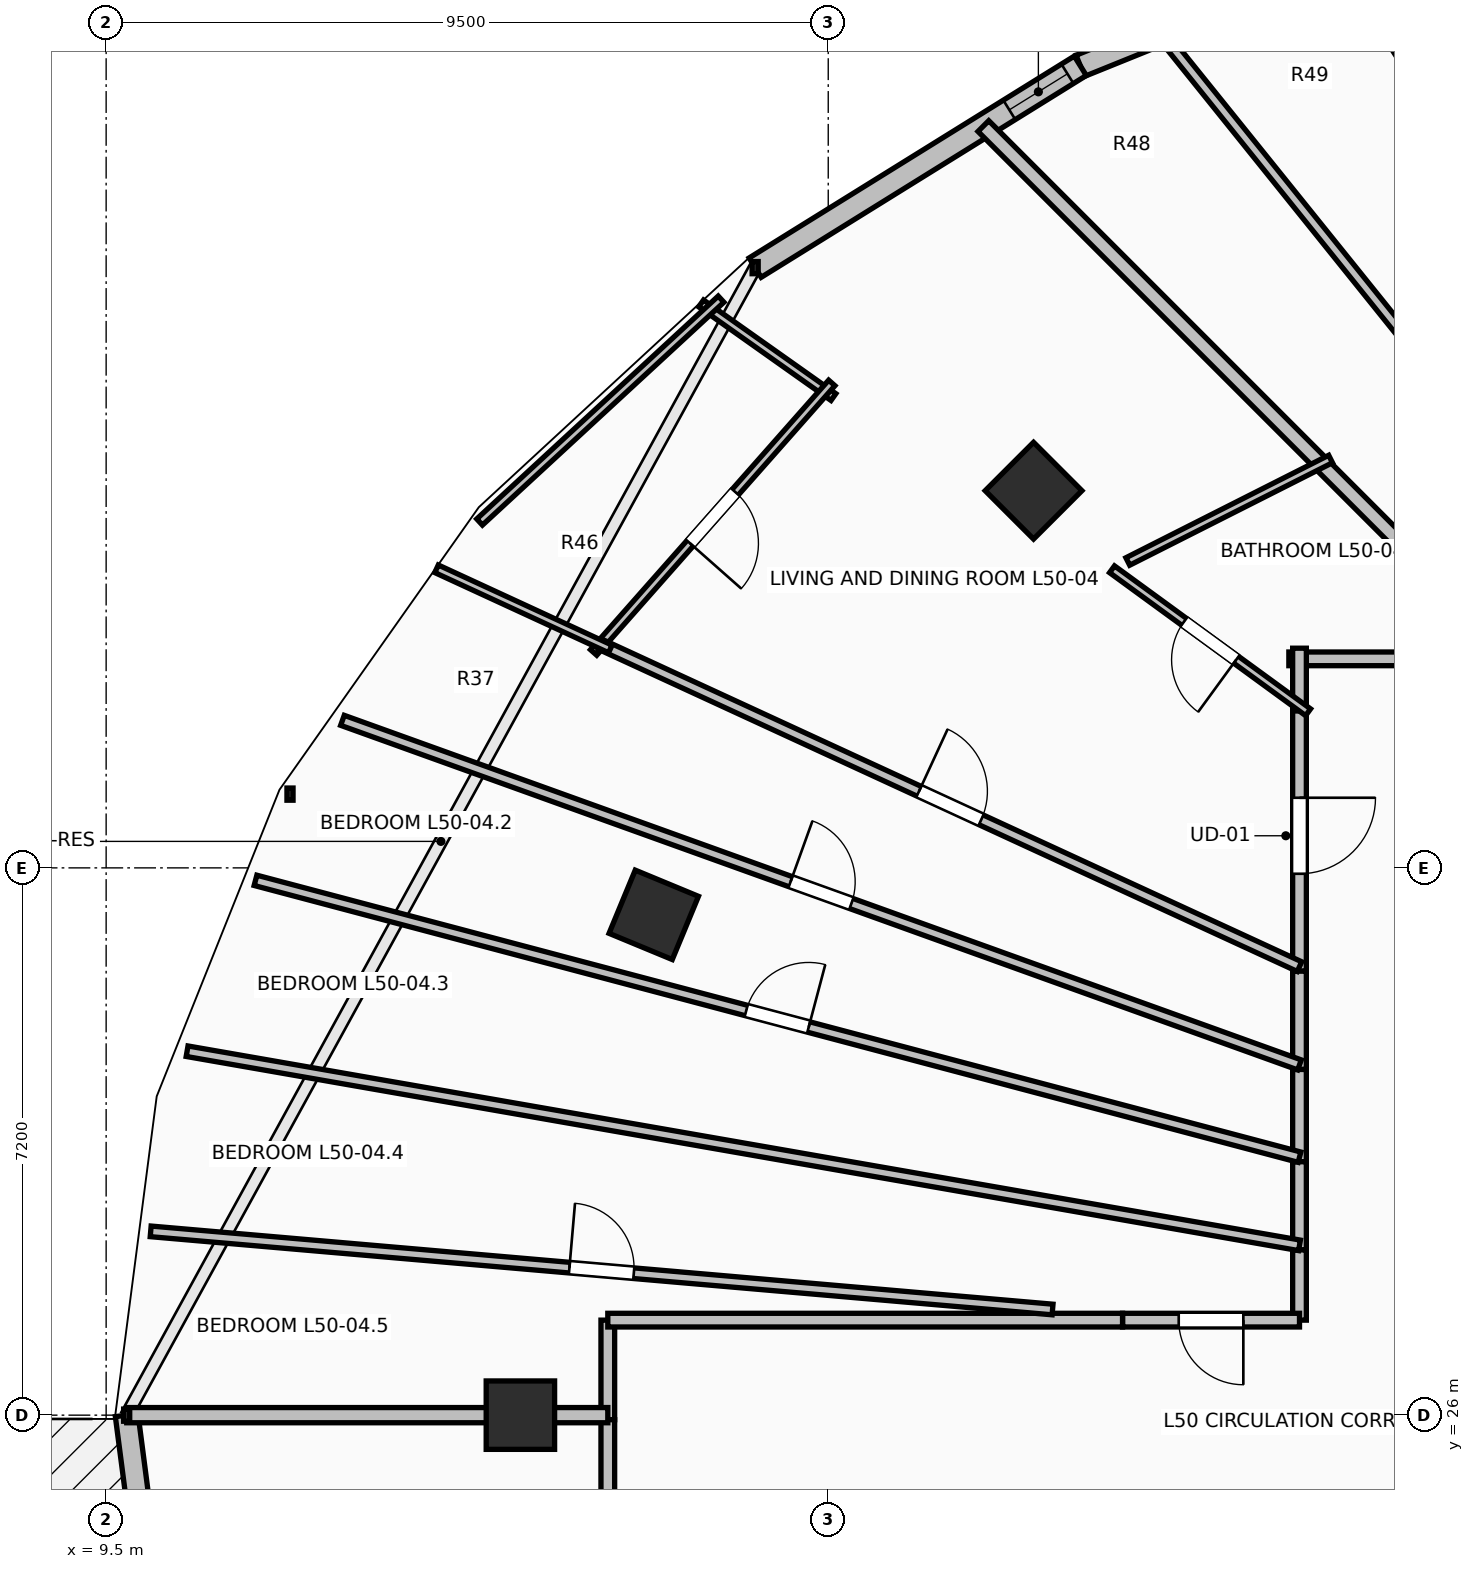
"""IFC4 building model, lengths in metres.
Left out: names, types, materials, properties, quantities, classifications, styles, units other than length and angle.
Written with IfcOpenShell. Run it as: python <this file> out.ifc"""

import sys

from ifc_helpers import new_model, si_unit, direction, frame, frame_2d, origin, origin_2d, place, context, subcontext, project, spatial, rectangle, extrude, element, fill, save


model = new_model("IFC4")
c1 = context("Model", 3, precision=1e-05, world=origin(), true_north=direction((0.0, 1.0)))
c2 = subcontext(c1, "Body", "Model", "MODEL_VIEW")
j1 = project(units=[si_unit("LENGTHUNIT", "METRE"), si_unit("PLANEANGLEUNIT", "RADIAN")], contexts=[c1])
p1 = place(None, origin())
s1 = spatial("IfcSite", under=j1, at=p1, CompositionType="ELEMENT")
p2 = place(p1, origin())
s2 = spatial("IfcBuilding", under=s1, at=p2, CompositionType="ELEMENT")
p3 = place(p2, frame((0.0, 0.0, 186.1)))
s3 = spatial("IfcBuildingStorey", under=s2, at=p3, CompositionType="ELEMENT", Elevation=186.1)
for number, where, z_axis, x_axis in (
    (1, (21.701, 38.162, 0.0), (0.0, 0.0, 1.0), (-0.707, 0.707, 0.0)),
    (2, (16.705, 32.582, 0.0), (0.0, 0.0, 1.0), (-0.924, 0.383, 0.0)),
    (3, (14.95, 26.0, 0.0), (0.0, 0.0, 1.0), (-1.0, 0.0, 0.0)),
):
    element("IfcColumn", number, at=place(p3, frame(where, z_axis=z_axis, x_axis=x_axis)), inside=s3, PredefinedType="COLUMN", context=c2, shape_type="SweptSolid", body=[
        extrude(rectangle(XDim=0.9, YDim=0.9, at=origin_2d()), origin(), (0.0, 0.0, 1.0), 3.5),
    ])
p4 = place(p3, frame((27.197, 45.725, 0.0), z_axis=(0.0, 0.0, 1.0), x_axis=(-0.927111094334, -0.374786630981, 0.0)))
e4 = element("IfcWall", 4, at=p4, inside=s3, PredefinedType="STANDARD", context=c2, shape_type="SweptSolid", body=[
    extrude(rectangle(XDim=5.264, YDim=0.3, at=frame_2d((2.632, 0.0))), origin(), (0.0, 0.0, 1.0), 3.24),
])
p5 = place(p4, frame((0.258, 0.0, 0.85)))
e5 = element("IfcOpeningElement", 5, at=p5, cuts=e4, PredefinedType="OPENING", context=c2, shape_type="SweptSolid", body=[
    extrude(rectangle(XDim=0.9, YDim=1.8, at=frame_2d((0.45, 0.9))), frame((0.0, 0.165, 0.0), z_axis=(0.0, -1.0, 0.0), x_axis=(1.0, 0.0, 0.0)), (0.0, 0.0, 1.0), 0.33),
])
p6 = place(p4, frame((2.032, 0.0, 0.85)))
e6 = element("IfcOpeningElement", 6, at=p6, cuts=e4, PredefinedType="OPENING", context=c2, shape_type="SweptSolid", body=[
    extrude(rectangle(XDim=1.2, YDim=1.95, at=frame_2d((0.6, 0.975))), frame((0.0, 0.165, 0.0), z_axis=(0.0, -1.0, 0.0), x_axis=(1.0, 0.0, 0.0)), (0.0, 0.0, 1.0), 0.33),
])
p7 = place(p3, frame((22.316, 43.752, 0.0), z_axis=(0.0, 0.0, 1.0), x_axis=(-0.849647657754, -0.527350791858, 0.0)))
e7 = element("IfcWall", 7, at=p7, inside=s3, PredefinedType="STANDARD", context=c2, shape_type="SweptSolid", body=[
    extrude(rectangle(XDim=5.035, YDim=0.3, at=frame_2d((2.518, 0.0))), origin(), (0.0, 0.0, 1.0), 3.24),
])
p8 = place(p7, frame((0.199, 0.0, 0.85)))
e8 = element("IfcOpeningElement", 8, at=p8, cuts=e7, PredefinedType="OPENING", context=c2, shape_type="SweptSolid", body=[
    extrude(rectangle(XDim=0.9, YDim=1.8, at=frame_2d((0.45, 0.9))), frame((0.0, 0.165, 0.0), z_axis=(0.0, -1.0, 0.0), x_axis=(1.0, 0.0, 0.0)), (0.0, 0.0, 1.0), 0.33),
])
p9 = place(p3, frame((9.77, 26.0, 0.0), z_axis=(0.0, 0.0, 1.0), x_axis=(0.129147853268, -0.991625348605, 0.0)))
e9 = element("IfcWall", 9, at=p9, inside=s3, PredefinedType="STANDARD", context=c2, shape_type="SweptSolid", body=[
    extrude(rectangle(XDim=4.2, YDim=0.3, at=frame_2d((2.1, 0.0))), origin(), (0.0, 0.0, 1.0), 3.24),
])
p10 = place(p9, frame((1.3, 0.0, 0.0)))
e10 = element("IfcOpeningElement", 10, at=p10, cuts=e9, PredefinedType="OPENING", context=c2, shape_type="SweptSolid", body=[
    extrude(rectangle(XDim=1.6, YDim=2.3, at=frame_2d((0.8, 1.15))), frame((0.0, 0.165, 0.0), z_axis=(0.0, -1.0, 0.0), x_axis=(1.0, 0.0, 0.0)), (0.0, 0.0, 1.0), 0.33),
])
p11 = place(p3, frame((25.2, 35.404, 0.0), z_axis=(0.0, 0.0, 1.0), x_axis=(0.0, -1.0, 0.0)))
e11 = element("IfcWall", 11, at=p11, inside=s3, PredefinedType="PARTITIONING", context=c2, shape_type="SweptSolid", body=[
    extrude(rectangle(XDim=3.563, YDim=0.18, at=frame_2d((1.781, 0.0))), origin(), (0.0, 0.0, 1.0), 2.432),
])
p12 = place(p11, frame((1.281, 0.0, 0.0)))
e12 = element("IfcOpeningElement", 12, at=p12, cuts=e11, PredefinedType="OPENING", context=c2, shape_type="SweptSolid", body=[
    extrude(rectangle(XDim=1.0, YDim=2.15, at=frame_2d((0.5, 1.075))), frame((0.0, 0.105, 0.0), z_axis=(0.0, -1.0, 0.0), x_axis=(1.0, 0.0, 0.0)), (0.0, 0.0, 1.0), 0.21),
])
p13 = place(p3, frame((28.105, 35.95, 0.0), z_axis=(0.0, 0.0, 1.0), x_axis=(-1.0, 0.0, 0.0)))
e13 = element("IfcWall", 13, at=p13, inside=s3, PredefinedType="PARTITIONING", context=c2, shape_type="SweptSolid", body=[
    extrude(rectangle(XDim=3.045, YDim=0.18, at=frame_2d((1.522, 0.0))), origin(), (0.0, 0.0, 1.0), 2.432),
])
p14 = place(p3, frame((25.2, 36.09, 0.0), z_axis=(0.0, 0.0, 1.0), x_axis=(0.0, -1.0, 0.0)))
e14 = element("IfcWall", 14, at=p14, inside=s3, PredefinedType="PARTITIONING", context=c2, shape_type="SweptSolid", body=[
    extrude(rectangle(XDim=0.826, YDim=0.18, at=frame_2d((0.413, 0.0))), origin(), (0.0, 0.0, 1.0), 2.432),
])
p15 = place(p3, frame((25.2, 31.841, 0.0), z_axis=(0.0, 0.0, 1.0), x_axis=(0.0, -1.0, 0.0)))
e15 = element("IfcWall", 15, at=p15, inside=s3, PredefinedType="PARTITIONING", context=c2, shape_type="SweptSolid", body=[
    extrude(rectangle(XDim=1.293, YDim=0.18, at=frame_2d((0.646, 0.0))), origin(), (0.0, 0.0, 1.0), 3.24),
])
p16 = place(p3, frame((25.2, 30.548, 0.0), z_axis=(0.0, 0.0, 1.0), x_axis=(0.0, -1.0, 0.0)))
e16 = element("IfcWall", 16, at=p16, inside=s3, PredefinedType="PARTITIONING", context=c2, shape_type="SweptSolid", body=[
    extrude(rectangle(XDim=1.214, YDim=0.18, at=frame_2d((0.607, 0.0))), origin(), (0.0, 0.0, 1.0), 2.432),
])
p17 = place(p3, frame((25.2, 29.334, 0.0), z_axis=(0.0, 0.0, 1.0), x_axis=(0.0, -1.0, 0.0)))
e17 = element("IfcWall", 17, at=p17, inside=s3, PredefinedType="PARTITIONING", context=c2, shape_type="SweptSolid", body=[
    extrude(rectangle(XDim=1.16, YDim=0.18, at=frame_2d((0.58, 0.0))), origin(), (0.0, 0.0, 1.0), 2.432),
])
p18 = place(p3, frame((25.2, 28.174, 0.0), z_axis=(0.0, 0.0, 1.0), x_axis=(0.0, -1.0, 0.0)))
e18 = element("IfcWall", 18, at=p18, inside=s3, PredefinedType="PARTITIONING", context=c2, shape_type="SweptSolid", body=[
    extrude(rectangle(XDim=0.924, YDim=0.18, at=frame_2d((0.462, 0.0))), origin(), (0.0, 0.0, 1.0), 2.432),
])
p19 = place(p3, frame((25.2, 27.25, 0.0), z_axis=(0.0, 0.0, 1.0), x_axis=(-1.0, 0.0, 0.0)))
e19 = element("IfcWall", 19, at=p19, inside=s3, PredefinedType="PARTITIONING", context=c2, shape_type="SweptSolid", body=[
    extrude(rectangle(XDim=2.328, YDim=0.18, at=frame_2d((1.164, 0.0))), origin(), (0.0, 0.0, 1.0), 2.432),
])
p20 = place(p19, frame((0.739, 0.0, 0.0)))
e20 = element("IfcOpeningElement", 20, at=p20, cuts=e19, PredefinedType="OPENING", context=c2, shape_type="SweptSolid", body=[
    extrude(rectangle(XDim=0.85, YDim=2.1, at=frame_2d((0.425, 1.05))), frame((0.0, 0.105, 0.0), z_axis=(0.0, -1.0, 0.0), x_axis=(1.0, 0.0, 0.0)), (0.0, 0.0, 1.0), 0.21),
])
p21 = place(p3, frame((16.1, 27.25, 0.0), z_axis=(0.0, 0.0, 1.0), x_axis=(0.0, -1.0, 0.0)))
e21 = element("IfcWall", 21, at=p21, inside=s3, PredefinedType="PARTITIONING", context=c2, shape_type="SweptSolid", body=[
    extrude(rectangle(XDim=1.31, YDim=0.18, at=frame_2d((0.655, 0.0))), origin(), (0.0, 0.0, 1.0), 2.432),
])
p22 = place(p3, frame((22.872, 27.25, 0.0), z_axis=(0.0, 0.0, 1.0), x_axis=(-1.0, 0.0, 0.0)))
e22 = element("IfcWall", 22, at=p22, inside=s3, PredefinedType="PARTITIONING", context=c2, shape_type="SweptSolid", body=[
    extrude(rectangle(XDim=6.772, YDim=0.18, at=frame_2d((3.386, 0.0))), origin(), (0.0, 0.0, 1.0), 2.432),
])
p23 = place(p3, frame((16.1, 25.94, 0.0), z_axis=(0.0, 0.0, 1.0), x_axis=(0.0, -1.0, 0.0)))
e23 = element("IfcWall", 23, at=p23, inside=s3, PredefinedType="PARTITIONING", context=c2, shape_type="SweptSolid", body=[
    extrude(rectangle(XDim=1.39, YDim=0.18, at=frame_2d((0.695, 0.0))), origin(), (0.0, 0.0, 1.0), 2.432),
])
p24 = place(p3, frame((25.749, 45.138, 0.0), z_axis=(0.0, 0.0, 1.0), x_axis=(0.539168632786, -0.842197830335, 0.0)))
e24 = element("IfcWall", 24, at=p24, inside=s3, PredefinedType="PARTITIONING", context=c2, shape_type="SweptSolid", body=[
    extrude(rectangle(XDim=10.909, YDim=0.14, at=frame_2d((5.455, 0.0))), origin(), (0.0, 0.0, 1.0), 2.432),
])
p25 = place(p3, frame((23.378, 44.178, 0.0), z_axis=(0.0, 0.0, 1.0), x_axis=(0.626756813732, -0.779214923137, 0.0)))
e25 = element("IfcWall", 25, at=p25, inside=s3, PredefinedType="PARTITIONING", context=c2, shape_type="SweptSolid", body=[
    extrude(rectangle(XDim=10.559, YDim=0.14, at=frame_2d((5.28, 0.0))), origin(), (0.0, 0.0, 1.0), 2.432),
])
p26 = place(p3, frame((21.041, 42.959, 0.0), z_axis=(0.0, 0.0, 1.0), x_axis=(0.707106781187, -0.707106781187, 0.0)))
e26 = element("IfcWall", 26, at=p26, inside=s3, PredefinedType="PARTITIONING", context=c2, shape_type="SweptSolid", body=[
    extrude(rectangle(XDim=9.912, YDim=0.2, at=frame_2d((4.956, 0.0))), origin(), (0.0, 0.0, 1.0), 2.432),
])
p27 = place(p3, frame((25.313, 35.248, 0.0), z_axis=(0.0, 0.0, 1.0), x_axis=(-0.807968083988, 0.58922625133, 0.0)))
e27 = element("IfcWall", 27, at=p27, inside=s3, PredefinedType="PARTITIONING", context=c2, shape_type="SweptSolid", body=[
    extrude(rectangle(XDim=3.192, YDim=0.11, at=frame_2d((1.596, 0.0))), origin(), (0.0, 0.0, 1.0), 2.432),
])
p28 = place(p27, frame((1.171, 0.0, 0.0)))
e28 = element("IfcOpeningElement", 28, at=p28, cuts=e27, PredefinedType="OPENING", context=c2, shape_type="SweptSolid", body=[
    extrude(rectangle(XDim=0.85, YDim=2.1, at=frame_2d((0.425, 1.05))), frame((0.0, 0.07, 0.0), z_axis=(0.0, -1.0, 0.0), x_axis=(1.0, 0.0, 0.0)), (0.0, 0.0, 1.0), 0.14),
])
p29 = place(p3, frame((22.941, 37.231, 0.0), z_axis=(0.0, 0.0, 1.0), x_axis=(0.892507731149, 0.451032094024, 0.0)))
e29 = element("IfcWall", 29, at=p29, inside=s3, PredefinedType="PARTITIONING", context=c2, shape_type="SweptSolid", body=[
    extrude(rectangle(XDim=2.989, YDim=0.11, at=frame_2d((1.495, 0.0))), origin(), (0.0, 0.0, 1.0), 2.432),
])
p30 = place(p3, frame((17.328, 40.626, 0.0), z_axis=(0.0, 0.0, 1.0), x_axis=(0.816262906602, -0.577680592807, 0.0)))
e30 = element("IfcWall", 30, at=p30, inside=s3, PredefinedType="PARTITIONING", context=c2, shape_type="SweptSolid", body=[
    extrude(rectangle(XDim=2.133, YDim=0.11, at=frame_2d((1.066, 0.0))), origin(), (0.0, 0.0, 1.0), 3.24),
])
p31 = place(p3, frame((19.047, 39.58, 0.0), z_axis=(0.0, 0.0, 1.0), x_axis=(-0.662189711464, -0.749336230294, 0.0)))
e31 = element("IfcWall", 31, at=p31, inside=s3, PredefinedType="PARTITIONING", context=c2, shape_type="SweptSolid", body=[
    extrude(rectangle(XDim=4.732, YDim=0.11, at=frame_2d((2.366, 0.0))), origin(), (0.0, 0.0, 1.0), 3.24),
])
p32 = place(p31, frame((1.916, 0.0, 0.0)))
e32 = element("IfcOpeningElement", 32, at=p32, cuts=e31, PredefinedType="OPENING", context=c2, shape_type="SweptSolid", body=[
    extrude(rectangle(XDim=0.9, YDim=2.1, at=frame_2d((0.45, 1.05))), frame((0.0, 0.07, 0.0), z_axis=(0.0, -1.0, 0.0), x_axis=(1.0, 0.0, 0.0)), (0.0, 0.0, 1.0), 0.14),
])
p33 = place(p3, frame((17.59, 40.682, 0.0), z_axis=(0.0, 0.0, 1.0), x_axis=(-0.734861902375, -0.678216768031, 0.0)))
e33 = element("IfcWall", 33, at=p33, inside=s3, PredefinedType="PARTITIONING", context=c2, shape_type="SweptSolid", body=[
    extrude(rectangle(XDim=4.323, YDim=0.11, at=frame_2d((2.162, 0.0))), origin(), (0.0, 0.0, 1.0), 3.24),
])
p34 = place(p3, frame((16.006, 36.139, 0.0), z_axis=(0.0, 0.0, 1.0), x_axis=(0.908157621609, -0.41862839645, 0.0)))
e34 = element("IfcWall", 34, at=p34, inside=s3, PredefinedType="PARTITIONING", context=c2, shape_type="SweptSolid", body=[
    extrude(rectangle(XDim=10.124, YDim=0.14, at=frame_2d((5.062, 0.0))), origin(), (0.0, 0.0, 1.0), 2.774),
])
p35 = place(p34, frame((4.612, 0.0, 0.0)))
e35 = element("IfcOpeningElement", 35, at=p35, cuts=e34, PredefinedType="OPENING", context=c2, shape_type="SweptSolid", body=[
    extrude(rectangle(XDim=0.9, YDim=2.1, at=frame_2d((0.45, 1.05))), frame((0.0, 0.085, 0.0), z_axis=(0.0, -1.0, 0.0), x_axis=(1.0, 0.0, 0.0)), (0.0, 0.0, 1.0), 0.17),
])
p36 = place(p3, frame((13.847, 37.135, 0.0), z_axis=(0.0, 0.0, 1.0), x_axis=(0.908101251341, -0.418750662462, 0.0)))
e36 = element("IfcWall", 36, at=p36, inside=s3, PredefinedType="PARTITIONING", context=c2, shape_type="SweptSolid", body=[
    extrude(rectangle(XDim=2.518, YDim=0.11, at=frame_2d((1.259, 0.0))), origin(), (0.0, 0.0, 1.0), 3.24),
])
p37 = place(p3, frame((12.609, 35.141, 0.0), z_axis=(0.0, 0.0, 1.0), x_axis=(0.940877411069, -0.338747246985, 0.0)))
e37 = element("IfcWall", 37, at=p37, inside=s3, PredefinedType="PARTITIONING", context=c2, shape_type="SweptSolid", body=[
    extrude(rectangle(XDim=13.382, YDim=0.14, at=frame_2d((6.691, 0.0))), origin(), (0.0, 0.0, 1.0), 2.774),
])
p38 = place(p37, frame((6.266, 0.0, 0.0)))
e38 = element("IfcOpeningElement", 38, at=p38, cuts=e37, PredefinedType="OPENING", context=c2, shape_type="SweptSolid", body=[
    extrude(rectangle(XDim=0.85, YDim=2.1, at=frame_2d((0.425, 1.05))), frame((0.0, 0.085, 0.0), z_axis=(0.0, -1.0, 0.0), x_axis=(1.0, 0.0, 0.0)), (0.0, 0.0, 1.0), 0.17),
])
p39 = place(p3, frame((11.465, 33.036, 0.0), z_axis=(0.0, 0.0, 1.0), x_axis=(0.966598137313, -0.256296782934, 0.0)))
e39 = element("IfcWall", 39, at=p39, inside=s3, PredefinedType="PARTITIONING", context=c2, shape_type="SweptSolid", body=[
    extrude(rectangle(XDim=14.209, YDim=0.14, at=frame_2d((7.105, 0.0))), origin(), (0.0, 0.0, 1.0), 2.432),
])
p40 = place(p39, frame((6.68, 0.0, 0.0)))
e40 = element("IfcOpeningElement", 40, at=p40, cuts=e39, PredefinedType="OPENING", context=c2, shape_type="SweptSolid", body=[
    extrude(rectangle(XDim=0.85, YDim=2.1, at=frame_2d((0.425, 1.05))), frame((0.0, 0.085, 0.0), z_axis=(0.0, -1.0, 0.0), x_axis=(1.0, 0.0, 0.0)), (0.0, 0.0, 1.0), 0.17),
])
p41 = place(p3, frame((10.565, 30.788, 0.0), z_axis=(0.0, 0.0, 1.0), x_axis=(0.985109541297, -0.171927867563, 0.0)))
e41 = element("IfcWall", 41, at=p41, inside=s3, PredefinedType="PARTITIONING", context=c2, shape_type="SweptSolid", body=[
    extrude(rectangle(XDim=14.856, YDim=0.14, at=frame_2d((7.428, 0.0))), origin(), (0.0, 0.0, 1.0), 2.774),
])
p42 = place(p3, frame((10.086, 28.418, 0.0), z_axis=(0.0, 0.0, 1.0), x_axis=(0.996267232338, -0.08632266081, 0.0)))
e42 = element("IfcWall", 42, at=p42, inside=s3, PredefinedType="PARTITIONING", context=c2, shape_type="SweptSolid", body=[
    extrude(rectangle(XDim=11.91, YDim=0.14, at=frame_2d((5.955, 0.0))), origin(), (0.0, 0.0, 1.0), 2.432),
])
p43 = place(p42, frame((5.53, 0.0, 0.0)))
e43 = element("IfcOpeningElement", 43, at=p43, cuts=e42, PredefinedType="OPENING", context=c2, shape_type="SweptSolid", body=[
    extrude(rectangle(XDim=0.85, YDim=2.1, at=frame_2d((0.425, 1.05))), frame((0.0, 0.085, 0.0), z_axis=(0.0, -1.0, 0.0), x_axis=(1.0, 0.0, 0.0)), (0.0, 0.0, 1.0), 0.17),
])
p44 = place(p3, frame((9.771, 26.0, 0.0), z_axis=(0.0, 0.0, 1.0), x_axis=(1.0, 0.0, 0.0)))
e44 = element("IfcWall", 44, at=p44, inside=s3, PredefinedType="PARTITIONING", context=c2, shape_type="SweptSolid", body=[
    extrude(rectangle(XDim=6.329, YDim=0.2, at=frame_2d((3.165, 0.0))), origin(), (0.0, 0.0, 1.0), 2.432),
])
p45 = place(p8, origin())
e45 = element("IfcWindow", 45, at=p45, inside=s3, PartitioningType="SINGLE_PANEL", PredefinedType="WINDOW", context=c2, shape_type="SweptSolid", body=[
    extrude(rectangle(XDim=0.9, YDim=1.8, at=frame_2d((0.45, 0.9))), frame((0.0, 0.03, 0.0), z_axis=(0.0, -1.0, 0.0), x_axis=(1.0, 0.0, 0.0)), (0.0, 0.0, 1.0), 0.06),
])
fill(e8, e45)
p46 = place(p12, origin())
e46 = element("IfcDoor", 46, at=p46, inside=s3, OperationType="SINGLE_SWING_LEFT", PredefinedType="DOOR", context=c2, shape_type="SweptSolid", body=[
    extrude(rectangle(XDim=1.0, YDim=2.15, at=frame_2d((0.5, 1.075))), frame((0.0, 0.025, 0.0), z_axis=(0.0, -1.0, 0.0), x_axis=(1.0, 0.0, 0.0)), (0.0, 0.0, 1.0), 0.05),
])
fill(e12, e46)
p47 = place(p28, origin())
e47 = element("IfcDoor", 47, at=p47, inside=s3, OperationType="SINGLE_SWING_LEFT", PredefinedType="DOOR", context=c2, shape_type="SweptSolid", body=[
    extrude(rectangle(XDim=0.85, YDim=2.1, at=frame_2d((0.425, 1.05))), frame((0.0, 0.025, 0.0), z_axis=(0.0, -1.0, 0.0), x_axis=(1.0, 0.0, 0.0)), (0.0, 0.0, 1.0), 0.05),
])
fill(e28, e47)
p48 = place(p32, origin())
e48 = element("IfcDoor", 48, at=p48, inside=s3, OperationType="SINGLE_SWING_RIGHT", PredefinedType="DOOR", context=c2, shape_type="SweptSolid", body=[
    extrude(rectangle(XDim=0.9, YDim=2.1, at=frame_2d((0.45, 1.05))), frame((0.0, 0.025, 0.0), z_axis=(0.0, -1.0, 0.0), x_axis=(1.0, 0.0, 0.0)), (0.0, 0.0, 1.0), 0.05),
])
fill(e32, e48)
p49 = place(p35, origin())
e49 = element("IfcDoor", 49, at=p49, inside=s3, OperationType="SINGLE_SWING_LEFT", PredefinedType="DOOR", context=c2, shape_type="SweptSolid", body=[
    extrude(rectangle(XDim=0.9, YDim=2.1, at=frame_2d((0.45, 1.05))), frame((0.0, 0.025, 0.0), z_axis=(0.0, -1.0, 0.0), x_axis=(1.0, 0.0, 0.0)), (0.0, 0.0, 1.0), 0.05),
])
fill(e35, e49)
p50 = place(p20, origin())
e50 = element("IfcDoor", 50, at=p50, inside=s3, OperationType="SINGLE_SWING_LEFT", PredefinedType="DOOR", context=c2, shape_type="SweptSolid", body=[
    extrude(rectangle(XDim=0.85, YDim=2.1, at=frame_2d((0.425, 1.05))), frame((0.0, 0.025, 0.0), z_axis=(0.0, -1.0, 0.0), x_axis=(1.0, 0.0, 0.0)), (0.0, 0.0, 1.0), 0.05),
])
fill(e20, e50)
p51 = place(p38, origin())
e51 = element("IfcDoor", 51, at=p51, inside=s3, OperationType="SINGLE_SWING_LEFT", PredefinedType="DOOR", context=c2, shape_type="SweptSolid", body=[
    extrude(rectangle(XDim=0.85, YDim=2.1, at=frame_2d((0.425, 1.05))), frame((0.0, 0.025, 0.0), z_axis=(0.0, -1.0, 0.0), x_axis=(1.0, 0.0, 0.0)), (0.0, 0.0, 1.0), 0.05),
])
fill(e38, e51)
p52 = place(p40, origin())
e52 = element("IfcDoor", 52, at=p52, inside=s3, OperationType="SINGLE_SWING_RIGHT", PredefinedType="DOOR", context=c2, shape_type="SweptSolid", body=[
    extrude(rectangle(XDim=0.85, YDim=2.1, at=frame_2d((0.425, 1.05))), frame((0.0, 0.025, 0.0), z_axis=(0.0, -1.0, 0.0), x_axis=(1.0, 0.0, 0.0)), (0.0, 0.0, 1.0), 0.05),
])
fill(e40, e52)
p53 = place(p43, origin())
e53 = element("IfcDoor", 53, at=p53, inside=s3, OperationType="SINGLE_SWING_LEFT", PredefinedType="DOOR", context=c2, shape_type="SweptSolid", body=[
    extrude(rectangle(XDim=0.85, YDim=2.1, at=frame_2d((0.425, 1.05))), frame((0.0, 0.025, 0.0), z_axis=(0.0, -1.0, 0.0), x_axis=(1.0, 0.0, 0.0)), (0.0, 0.0, 1.0), 0.05),
])
fill(e43, e53)
save(model, sys.argv[1])
